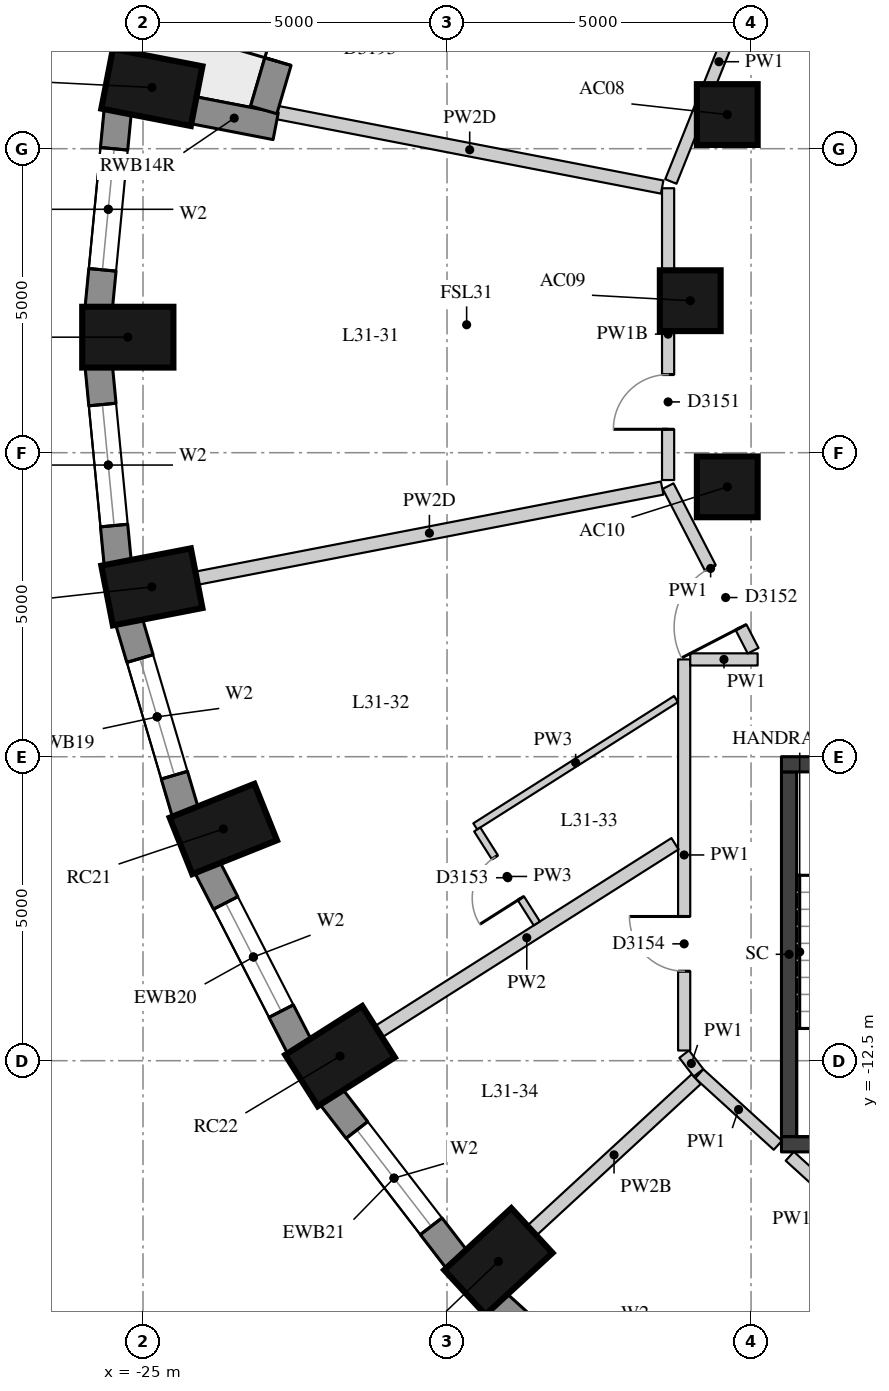
"""IFC4 building model, lengths in metres.
Left out: names, types, materials, properties, quantities, classifications, styles, units other than length and angle.
Written with IfcOpenShell. Run it as: python <this file> out.ifc"""

import sys

from ifc_helpers import new_model, si_unit, direction, frame, frame_2d, origin, origin_2d, place, context, subcontext, project, spatial, rectangle, extrude, element, fill, save


model = new_model("IFC4")
c1 = context("Model", 3, precision=1e-05, world=origin(), true_north=direction((0.0, 1.0)))
c2 = subcontext(c1, "Body", "Model", "MODEL_VIEW")
j1 = project(units=[si_unit("LENGTHUNIT", "METRE"), si_unit("PLANEANGLEUNIT", "RADIAN")], contexts=[c1])
p1 = place(None, origin())
s1 = spatial("IfcSite", under=j1, at=p1, CompositionType="ELEMENT")
p2 = place(p1, origin())
s2 = spatial("IfcBuilding", under=s1, at=p2, CompositionType="ELEMENT")
p3 = place(p2, frame((0.0, 0.0, 112.0)))
s3 = spatial("IfcBuildingStorey", under=s2, at=p3, CompositionType="ELEMENT", Elevation=112.0)
for number, where, z_axis, x_axis in (
    (1, (-24.854, 3.507, 0.0), (0.0, 0.0, 1.0), (-0.982, 0.19, 0.0)),
    (2, (-25.25, -0.6, 0.0), (0.0, 0.0, 1.0), (-1.0, 0.0, 0.0)),
    (3, (-24.854, -4.707, 0.0), (0.0, 0.0, 1.0), (-0.982, -0.19, 0.0)),
    (4, (-23.679, -8.689, 0.0), (0.0, 0.0, 1.0), (-0.929, -0.371, 0.0)),
    (5, (-21.76, -12.425, 0.0), (0.0, 0.0, 1.0), (-0.845, -0.536, 0.0)),
    (6, (-19.156, -15.802, 0.0), (0.0, 0.0, 1.0), (-0.735, -0.678, 0.0)),
):
    element("IfcColumn", number, at=place(p3, frame(where, z_axis=z_axis, x_axis=x_axis)), inside=s3, PredefinedType="COLUMN", context=c2, shape_type="SweptSolid", body=[
        extrude(rectangle(XDim=1.5, YDim=1.0, at=origin_2d()), origin(), (0.0, 0.0, 1.0), 3.3),
    ])
for number, where, z_axis, x_axis in (
    (7, (-15.391, 3.062, 0.0), (0.0, 0.0, 1.0), (1.0, 0.0, 0.0)),
    (8, (-16.0, 0.0, 0.0), (0.0, 0.0, 1.0), (1.0, 0.0, 0.0)),
    (9, (-15.391, -3.062, 0.0), (0.0, 0.0, 1.0), (1.0, 0.0, 0.0)),
):
    element("IfcColumn", number, at=place(p3, frame(where, z_axis=z_axis, x_axis=x_axis)), inside=s3, PredefinedType="COLUMN", context=c2, shape_type="SweptSolid", body=[
        extrude(rectangle(XDim=1.0, YDim=1.0, at=origin_2d()), origin(), (0.0, 0.0, 1.0), 3.3),
    ])
p4 = place(p3, frame((-25.415, 3.126, 0.0), z_axis=(0.0, 0.0, 1.0), x_axis=(-0.095967726544, -0.995384446062, 0.0)))
e10 = element("IfcWall", 10, at=p4, inside=s3, PredefinedType="SOLIDWALL", context=c2, shape_type="SweptSolid", body=[
    extrude(rectangle(XDim=3.261, YDim=0.45, at=frame_2d((1.631, 0.0))), origin(), (0.0, 0.0, 1.0), 3.02),
])
p5 = place(p4, frame((0.631, 0.0, 0.4)))
e11 = element("IfcOpeningElement", 11, at=p5, cuts=e10, PredefinedType="OPENING", context=c2, shape_type="SweptSolid", body=[
    extrude(rectangle(XDim=2.0, YDim=1.75, at=frame_2d((1.0, 0.875))), frame((0.0, 0.235, 0.0), z_axis=(0.0, -1.0, 0.0), x_axis=(1.0, 0.0, 0.0)), (0.0, 0.0, 1.0), 0.47),
])
p6 = place(p3, frame((-25.728, -1.08, 0.0), z_axis=(0.0, 0.0, 1.0), x_axis=(0.095967726544, -0.995384446062, 0.0)))
e12 = element("IfcWall", 12, at=p6, inside=s3, PredefinedType="SOLIDWALL", context=c2, shape_type="SweptSolid", body=[
    extrude(rectangle(XDim=3.261, YDim=0.45, at=frame_2d((1.631, 0.0))), origin(), (0.0, 0.0, 1.0), 3.02),
])
p7 = place(p6, frame((0.631, 0.0, 0.4)))
e13 = element("IfcOpeningElement", 13, at=p7, cuts=e12, PredefinedType="OPENING", context=c2, shape_type="SweptSolid", body=[
    extrude(rectangle(XDim=2.0, YDim=1.75, at=frame_2d((1.0, 0.875))), frame((0.0, 0.235, 0.0), z_axis=(0.0, -1.0, 0.0), x_axis=(1.0, 0.0, 0.0)), (0.0, 0.0, 1.0), 0.47),
])
p8 = place(p3, frame((-25.232, -5.269, 0.0), z_axis=(0.0, 0.0, 1.0), x_axis=(0.283051078697, -0.959104836214, 0.0)))
e14 = element("IfcWall", 14, at=p8, inside=s3, PredefinedType="SOLIDWALL", context=c2, shape_type="SweptSolid", body=[
    extrude(rectangle(XDim=3.286, YDim=0.45, at=frame_2d((1.643, 0.0))), origin(), (0.0, 0.0, 1.0), 3.02),
])
p9 = place(p8, frame((0.643, 0.0, 0.4)))
e15 = element("IfcOpeningElement", 15, at=p9, cuts=e14, PredefinedType="OPENING", context=c2, shape_type="SweptSolid", body=[
    extrude(rectangle(XDim=2.0, YDim=1.75, at=frame_2d((1.0, 0.875))), frame((0.0, 0.235, 0.0), z_axis=(0.0, -1.0, 0.0), x_axis=(1.0, 0.0, 0.0)), (0.0, 0.0, 1.0), 0.47),
])
p10 = place(p3, frame((-23.945, -9.312, 0.0), z_axis=(0.0, 0.0, 1.0), x_axis=(0.456828186229, -0.889554949549, 0.0)))
e16 = element("IfcWall", 16, at=p10, inside=s3, PredefinedType="SOLIDWALL", context=c2, shape_type="SweptSolid", body=[
    extrude(rectangle(XDim=3.333, YDim=0.45, at=frame_2d((1.667, 0.0))), origin(), (0.0, 0.0, 1.0), 3.02),
])
p11 = place(p10, frame((0.666, 0.0, 0.4)))
e17 = element("IfcOpeningElement", 17, at=p11, cuts=e16, PredefinedType="OPENING", context=c2, shape_type="SweptSolid", body=[
    extrude(rectangle(XDim=2.0, YDim=1.75, at=frame_2d((1.0, 0.875))), frame((0.0, 0.235, 0.0), z_axis=(0.0, -1.0, 0.0), x_axis=(1.0, 0.0, 0.0)), (0.0, 0.0, 1.0), 0.47),
])
p12 = place(p3, frame((-21.908, -13.087, 0.0), z_axis=(0.0, 0.0, 1.0), x_axis=(0.610693945156, -0.791866721961, 0.0)))
e18 = element("IfcWall", 18, at=p12, inside=s3, PredefinedType="SOLIDWALL", context=c2, shape_type="SweptSolid", body=[
    extrude(rectangle(XDim=3.395, YDim=0.45, at=frame_2d((1.697, 0.0))), origin(), (0.0, 0.0, 1.0), 3.02),
])
p13 = place(p12, frame((0.697, 0.0, 0.4)))
e19 = element("IfcOpeningElement", 19, at=p13, cuts=e18, PredefinedType="OPENING", context=c2, shape_type="SweptSolid", body=[
    extrude(rectangle(XDim=2.0, YDim=1.75, at=frame_2d((1.0, 0.875))), frame((0.0, 0.235, 0.0), z_axis=(0.0, -1.0, 0.0), x_axis=(1.0, 0.0, 0.0)), (0.0, 0.0, 1.0), 0.47),
])
p14 = place(p3, frame((-19.184, -16.481, 0.0), z_axis=(0.0, 0.0, 1.0), x_axis=(0.740364106106, -0.672206062446, 0.0)))
e20 = element("IfcWall", 20, at=p14, inside=s3, PredefinedType="SOLIDWALL", context=c2, shape_type="SweptSolid", body=[
    extrude(rectangle(XDim=3.464, YDim=0.45, at=frame_2d((1.732, 0.0))), origin(), (0.0, 0.0, 1.0), 3.02),
])
p15 = place(p14, frame((0.732, 0.0, 0.4)))
e21 = element("IfcOpeningElement", 21, at=p15, cuts=e20, PredefinedType="OPENING", context=c2, shape_type="SweptSolid", body=[
    extrude(rectangle(XDim=2.0, YDim=1.75, at=frame_2d((1.0, 0.875))), frame((0.0, 0.235, 0.0), z_axis=(0.0, -1.0, 0.0), x_axis=(1.0, 0.0, 0.0)), (0.0, 0.0, 1.0), 0.47),
])
p16 = place(p3, frame((-24.183, 3.135, 0.0), z_axis=(0.0, 0.0, 1.0), x_axis=(0.981744955624, -0.190202108576, 0.0)))
e22 = element("IfcWall", 22, at=p16, inside=s3, PredefinedType="SOLIDWALL", context=c2, shape_type="SweptSolid", body=[
    extrude(rectangle(XDim=1.39, YDim=0.45, at=frame_2d((0.695, 0.0))), origin(), (0.0, 0.0, 1.0), 2.47),
])
p17 = place(p3, frame((-21.939, 6.791, 0.0), z_axis=(0.0, 0.0, 1.0), x_axis=(-0.282350284167, -0.959311376473, 0.0)))
e23 = element("IfcWall", 23, at=p17, inside=s3, PredefinedType="SOLIDWALL", context=c2, shape_type="SweptSolid", body=[
    extrude(rectangle(XDim=3.808, YDim=0.45, at=frame_2d((1.904, 0.0))), origin(), (0.0, 0.0, 1.0), 3.02),
])
p18 = place(p17, frame((0.829, 0.0, 0.4)))
e24 = element("IfcOpeningElement", 24, at=p18, cuts=e23, PredefinedType="OPENING", context=c2, shape_type="SweptSolid", body=[
    extrude(rectangle(XDim=1.0, YDim=1.75, at=frame_2d((0.5, 0.875))), frame((0.0, 0.235, 0.0), z_axis=(0.0, -1.0, 0.0), x_axis=(1.0, 0.0, 0.0)), (0.0, 0.0, 1.0), 0.47),
])
p19 = place(p17, frame((1.979, 0.0, 0.0)))
e25 = element("IfcOpeningElement", 25, at=p19, cuts=e23, PredefinedType="OPENING", context=c2, shape_type="SweptSolid", body=[
    extrude(rectangle(XDim=1.0, YDim=2.15, at=frame_2d((0.5, 1.075))), frame((0.0, 0.235, 0.0), z_axis=(0.0, -1.0, 0.0), x_axis=(1.0, 0.0, 0.0)), (0.0, 0.0, 1.0), 0.47),
])
p20 = place(p3, frame((-14.375, -13.75, -0.28), z_axis=(0.0, 0.0, 1.0), x_axis=(0.0, 1.0, 0.0)))
e26 = element("IfcWall", 26, at=p20, inside=s3, PredefinedType="SHEAR", context=c2, shape_type="SweptSolid", body=[
    extrude(rectangle(XDim=6.0, YDim=0.25, at=frame_2d((3.0, 0.0))), origin(), (0.0, 0.0, 1.0), 3.3),
])
for number, where, z_axis, x_axis in (
    (27, (-14.5, -7.625, -0.28), (0.0, 0.0, 1.0), (1.0, 0.0, 0.0)),
    (28, (-14.5, -13.875, -0.28), (0.0, 0.0, 1.0), (1.0, 0.0, 0.0)),
):
    element("IfcWall", number, at=place(p3, frame(where, z_axis=z_axis, x_axis=x_axis)), inside=s3, PredefinedType="SHEAR", context=c2, shape_type="SweptSolid", body=[
        extrude(rectangle(XDim=5.2, YDim=0.25, at=frame_2d((2.6, 0.0))), origin(), (0.0, 0.0, 1.0), 3.3),
    ])
p21 = place(p3, frame((-14.56, -13.891, 0.0), z_axis=(0.0, 0.0, 1.0), x_axis=(-0.739440483737, 0.673221932954, 0.0)))
e29 = element("IfcWall", 29, at=p21, inside=s3, PredefinedType="PARTITIONING", context=c2, shape_type="SweptSolid", body=[
    extrude(rectangle(XDim=1.748, YDim=0.2, at=frame_2d((0.874, 0.0))), origin(), (0.0, 0.0, 1.0), 3.02),
])
p22 = place(p3, frame((-15.864, -12.699, 0.0), z_axis=(0.0, 0.0, 1.0), x_axis=(-0.61004607296, 0.792365943782, 0.0)))
e30 = element("IfcWall", 30, at=p22, inside=s3, PredefinedType="PARTITIONING", context=c2, shape_type="SweptSolid", body=[
    extrude(rectangle(XDim=0.387, YDim=0.2, at=frame_2d((0.193, 0.0))), origin(), (0.0, 0.0, 1.0), 3.02),
])
p23 = place(p3, frame((-16.1, -12.332, 0.0), z_axis=(0.0, 0.0, 1.0), x_axis=(0.0, 1.0, 0.0)))
e31 = element("IfcWall", 31, at=p23, inside=s3, PredefinedType="PARTITIONING", context=c2, shape_type="SweptSolid", body=[
    extrude(rectangle(XDim=6.432, YDim=0.2, at=frame_2d((3.216, 0.0))), origin(), (0.0, 0.0, 1.0), 3.02),
])
p24 = place(p23, frame((1.304, 0.0, 0.0)))
e32 = element("IfcOpeningElement", 32, at=p24, cuts=e31, PredefinedType="OPENING", context=c2, shape_type="SweptSolid", body=[
    extrude(rectangle(XDim=0.9, YDim=2.1, at=frame_2d((0.45, 1.05))), frame((0.0, 0.11, 0.0), z_axis=(0.0, -1.0, 0.0), x_axis=(1.0, 0.0, 0.0)), (0.0, 0.0, 1.0), 0.22),
])
p25 = place(p3, frame((-16.0, -5.9, 0.0), z_axis=(0.0, 0.0, 1.0), x_axis=(1.0, 0.0, 0.0)))
e33 = element("IfcWall", 33, at=p25, inside=s3, PredefinedType="PARTITIONING", context=c2, shape_type="SweptSolid", body=[
    extrude(rectangle(XDim=1.108, YDim=0.2, at=frame_2d((0.554, 0.0))), origin(), (0.0, 0.0, 1.0), 3.02),
])
p26 = place(p3, frame((-14.966, -5.757, 0.0), z_axis=(0.0, 0.0, 1.0), x_axis=(-0.458904116107, 0.888485797422, 0.0)))
e34 = element("IfcWall", 34, at=p26, inside=s3, PredefinedType="PARTITIONING", context=c2, shape_type="SweptSolid", body=[
    extrude(rectangle(XDim=3.047, YDim=0.2, at=frame_2d((1.524, 0.0))), origin(), (0.0, 0.0, 1.0), 3.02),
])
p27 = place(p26, frame((0.435, 0.0, 0.0)))
e35 = element("IfcOpeningElement", 35, at=p27, cuts=e34, PredefinedType="OPENING", context=c2, shape_type="SweptSolid", body=[
    extrude(rectangle(XDim=1.1, YDim=2.1, at=frame_2d((0.55, 1.05))), frame((0.0, 0.11, 0.0), z_axis=(0.0, -1.0, 0.0), x_axis=(1.0, 0.0, 0.0)), (0.0, 0.0, 1.0), 0.22),
])
p28 = place(p3, frame((-16.364, -2.95, 0.0), z_axis=(0.0, 0.0, 1.0), x_axis=(0.0, 1.0, 0.0)))
e36 = element("IfcWall", 36, at=p28, inside=s3, PredefinedType="PARTITIONING", context=c2, shape_type="SweptSolid", body=[
    extrude(rectangle(XDim=4.799, YDim=0.2, at=frame_2d((2.4, 0.0))), origin(), (0.0, 0.0, 1.0), 2.52),
])
p29 = place(p28, frame((0.835, 0.0, 0.0)))
e37 = element("IfcOpeningElement", 37, at=p29, cuts=e36, PredefinedType="OPENING", context=c2, shape_type="SweptSolid", body=[
    extrude(rectangle(XDim=0.9, YDim=2.1, at=frame_2d((0.45, 1.05))), frame((0.0, 0.11, 0.0), z_axis=(0.0, -1.0, 0.0), x_axis=(1.0, 0.0, 0.0)), (0.0, 0.0, 1.0), 0.22),
])
p30 = place(p3, frame((-16.319, 1.961, 0.0), z_axis=(0.0, 0.0, 1.0), x_axis=(0.372352515432, 0.928091377102, 0.0)))
e38 = element("IfcWall", 38, at=p30, inside=s3, PredefinedType="PARTITIONING", context=c2, shape_type="SweptSolid", body=[
    extrude(rectangle(XDim=4.244, YDim=0.2, at=frame_2d((2.122, 0.0))), origin(), (0.0, 0.0, 1.0), 3.02),
])
p31 = place(p30, frame((2.481, 0.0, 0.0)))
e39 = element("IfcOpeningElement", 39, at=p31, cuts=e38, PredefinedType="OPENING", context=c2, shape_type="SweptSolid", body=[
    extrude(rectangle(XDim=1.1, YDim=2.1, at=frame_2d((0.55, 1.05))), frame((0.0, 0.11, 0.0), z_axis=(0.0, -1.0, 0.0), x_axis=(1.0, 0.0, 0.0)), (0.0, 0.0, 1.0), 0.22),
])
p32 = place(p3, frame((-13.24, -15.093, 0.0), z_axis=(0.0, 0.0, 1.0), x_axis=(-0.739438095557, 0.673224556028, 0.0)))
e40 = element("IfcWall", 40, at=p32, inside=s3, PredefinedType="PARTITIONING", context=c2, shape_type="SweptSolid", body=[
    extrude(rectangle(XDim=1.519, YDim=0.2, at=frame_2d((0.76, 0.0))), origin(), (0.0, 0.0, 1.0), 3.02),
])
p33 = place(p3, frame((-22.793, 3.095, 0.0), z_axis=(0.0, 0.0, 1.0), x_axis=(0.981772102901, -0.190061931918, 0.0)))
e41 = element("IfcWall", 41, at=p33, inside=s3, PredefinedType="PARTITIONING", context=c2, shape_type="SweptSolid", body=[
    extrude(rectangle(XDim=6.448, YDim=0.22, at=frame_2d((3.224, 0.0))), origin(), (0.0, 0.0, 1.0), 2.47),
])
p34 = place(p3, frame((-24.118, -4.564, 0.0), z_axis=(0.0, 0.0, 1.0), x_axis=(0.981765151757, 0.190097834799, 0.0)))
e42 = element("IfcWall", 42, at=p34, inside=s3, PredefinedType="PARTITIONING", context=c2, shape_type="SweptSolid", body=[
    extrude(rectangle(XDim=7.798, YDim=0.22, at=frame_2d((3.899, 0.0))), origin(), (0.0, 0.0, 1.0), 2.47),
])
p35 = place(p3, frame((-21.126, -12.023, 0.0), z_axis=(0.0, 0.0, 1.0), x_axis=(0.844499715613, 0.535556001114, 0.0)))
e43 = element("IfcWall", 43, at=p35, inside=s3, PredefinedType="PARTITIONING", context=c2, shape_type="SweptSolid", body=[
    extrude(rectangle(XDim=5.773, YDim=0.22, at=frame_2d((2.887, 0.0))), origin(), (0.0, 0.0, 1.0), 3.02),
])
p36 = place(p3, frame((-18.604, -15.294, 0.0), z_axis=(0.0, 0.0, 1.0), x_axis=(0.73529495628, 0.677747244383, 0.0)))
e44 = element("IfcWall", 44, at=p36, inside=s3, PredefinedType="PARTITIONING", context=c2, shape_type="SweptSolid", body=[
    extrude(rectangle(XDim=3.674, YDim=0.22, at=frame_2d((1.837, 0.0))), origin(), (0.0, 0.0, 1.0), 2.57),
])
p37 = place(p3, frame((-16.234, -6.552, 0.0), z_axis=(0.0, 0.0, 1.0), x_axis=(-0.844514089089, -0.535533335406, 0.0)))
e45 = element("IfcWall", 45, at=p37, inside=s3, PredefinedType="PARTITIONING", context=c2, shape_type="SweptSolid", body=[
    extrude(rectangle(XDim=3.91, YDim=0.12, at=frame_2d((1.955, 0.0))), origin(), (0.0, 0.0, 1.0), 3.02),
])
p38 = place(p3, frame((-19.503, -8.697, 0.0), z_axis=(0.0, 0.0, 1.0), x_axis=(0.535467767516, -0.844555664211, 0.0)))
e46 = element("IfcWall", 46, at=p38, inside=s3, PredefinedType="PARTITIONING", context=c2, shape_type="SweptSolid", body=[
    extrude(rectangle(XDim=1.83, YDim=0.12, at=frame_2d((0.915, 0.0))), origin(), (0.0, 0.0, 1.0), 3.02),
])
p39 = place(p38, frame((0.54, 0.0, 0.0)))
e47 = element("IfcOpeningElement", 47, at=p39, cuts=e46, PredefinedType="OPENING", context=c2, shape_type="SweptSolid", body=[
    extrude(rectangle(XDim=0.8, YDim=2.1, at=frame_2d((0.4, 1.05))), frame((0.0, 0.07, 0.0), z_axis=(0.0, -1.0, 0.0), x_axis=(1.0, 0.0, 0.0)), (0.0, 0.0, 1.0), 0.14),
])
p40 = place(p5, origin())
e48 = element("IfcWindow", 48, at=p40, inside=s3, PartitioningType="SINGLE_PANEL", PredefinedType="WINDOW", context=c2, shape_type="SweptSolid", body=[
    extrude(rectangle(XDim=2.0, YDim=1.75, at=frame_2d((1.0, 0.875))), frame((0.0, 0.035, 0.0), z_axis=(0.0, -1.0, 0.0), x_axis=(1.0, 0.0, 0.0)), (0.0, 0.0, 1.0), 0.06),
])
fill(e11, e48)
p41 = place(p7, origin())
e49 = element("IfcWindow", 49, at=p41, inside=s3, PartitioningType="SINGLE_PANEL", PredefinedType="WINDOW", context=c2, shape_type="SweptSolid", body=[
    extrude(rectangle(XDim=2.0, YDim=1.75, at=frame_2d((1.0, 0.875))), frame((0.0, 0.035, 0.0), z_axis=(0.0, -1.0, 0.0), x_axis=(1.0, 0.0, 0.0)), (0.0, 0.0, 1.0), 0.06),
])
fill(e13, e49)
p42 = place(p9, origin())
e50 = element("IfcWindow", 50, at=p42, inside=s3, PartitioningType="SINGLE_PANEL", PredefinedType="WINDOW", context=c2, shape_type="SweptSolid", body=[
    extrude(rectangle(XDim=2.0, YDim=1.75, at=frame_2d((1.0, 0.875))), frame((0.0, 0.035, 0.0), z_axis=(0.0, -1.0, 0.0), x_axis=(1.0, 0.0, 0.0)), (0.0, 0.0, 1.0), 0.06),
])
fill(e15, e50)
p43 = place(p11, origin())
e51 = element("IfcWindow", 51, at=p43, inside=s3, PartitioningType="SINGLE_PANEL", PredefinedType="WINDOW", context=c2, shape_type="SweptSolid", body=[
    extrude(rectangle(XDim=2.0, YDim=1.75, at=frame_2d((1.0, 0.875))), frame((0.0, 0.035, 0.0), z_axis=(0.0, -1.0, 0.0), x_axis=(1.0, 0.0, 0.0)), (0.0, 0.0, 1.0), 0.06),
])
fill(e17, e51)
p44 = place(p13, origin())
e52 = element("IfcWindow", 52, at=p44, inside=s3, PartitioningType="SINGLE_PANEL", PredefinedType="WINDOW", context=c2, shape_type="SweptSolid", body=[
    extrude(rectangle(XDim=2.0, YDim=1.75, at=frame_2d((1.0, 0.875))), frame((0.0, 0.035, 0.0), z_axis=(0.0, -1.0, 0.0), x_axis=(1.0, 0.0, 0.0)), (0.0, 0.0, 1.0), 0.06),
])
fill(e19, e52)
p45 = place(p19, frame((1.0, 0.0, 0.0), z_axis=(0.0, 0.0, 1.0), x_axis=(-1.0, 0.0, 0.0)))
e53 = element("IfcDoor", 53, at=p45, inside=s3, OperationType="SINGLE_SWING_LEFT", PredefinedType="DOOR", context=c2, shape_type="SweptSolid", body=[
    extrude(rectangle(XDim=1.0, YDim=2.15, at=frame_2d((0.5, 1.075))), frame((0.0, 0.075, 0.0), z_axis=(0.0, -1.0, 0.0), x_axis=(1.0, 0.0, 0.0)), (0.0, 0.0, 1.0), 0.05),
])
fill(e25, e53)
p46 = place(p29, origin())
e54 = element("IfcDoor", 54, at=p46, inside=s3, OperationType="SINGLE_SWING_LEFT", PredefinedType="DOOR", context=c2, shape_type="SweptSolid", body=[
    extrude(rectangle(XDim=0.9, YDim=2.1, at=frame_2d((0.45, 1.05))), frame((0.0, 0.025, 0.0), z_axis=(0.0, -1.0, 0.0), x_axis=(1.0, 0.0, 0.0)), (0.0, 0.0, 1.0), 0.05),
])
fill(e37, e54)
p47 = place(p27, origin())
e55 = element("IfcDoor", 55, at=p47, inside=s3, OperationType="SINGLE_SWING_LEFT", PredefinedType="DOOR", context=c2, shape_type="SweptSolid", body=[
    extrude(rectangle(XDim=1.1, YDim=2.1, at=frame_2d((0.55, 1.05))), frame((0.0, 0.025, 0.0), z_axis=(0.0, -1.0, 0.0), x_axis=(1.0, 0.0, 0.0)), (0.0, 0.0, 1.0), 0.05),
])
fill(e35, e55)
p48 = place(p39, origin())
e56 = element("IfcDoor", 56, at=p48, inside=s3, OperationType="SINGLE_SWING_LEFT", PredefinedType="DOOR", context=c2, shape_type="SweptSolid", body=[
    extrude(rectangle(XDim=0.8, YDim=2.1, at=frame_2d((0.4, 1.05))), frame((0.0, 0.025, 0.0), z_axis=(0.0, -1.0, 0.0), x_axis=(1.0, 0.0, 0.0)), (0.0, 0.0, 1.0), 0.05),
])
fill(e47, e56)
p49 = place(p24, origin())
e57 = element("IfcDoor", 57, at=p49, inside=s3, OperationType="SINGLE_SWING_RIGHT", PredefinedType="DOOR", context=c2, shape_type="SweptSolid", body=[
    extrude(rectangle(XDim=0.9, YDim=2.1, at=frame_2d((0.45, 1.05))), frame((0.0, 0.025, 0.0), z_axis=(0.0, -1.0, 0.0), x_axis=(1.0, 0.0, 0.0)), (0.0, 0.0, 1.0), 0.05),
])
fill(e32, e57)
save(model, sys.argv[1])
